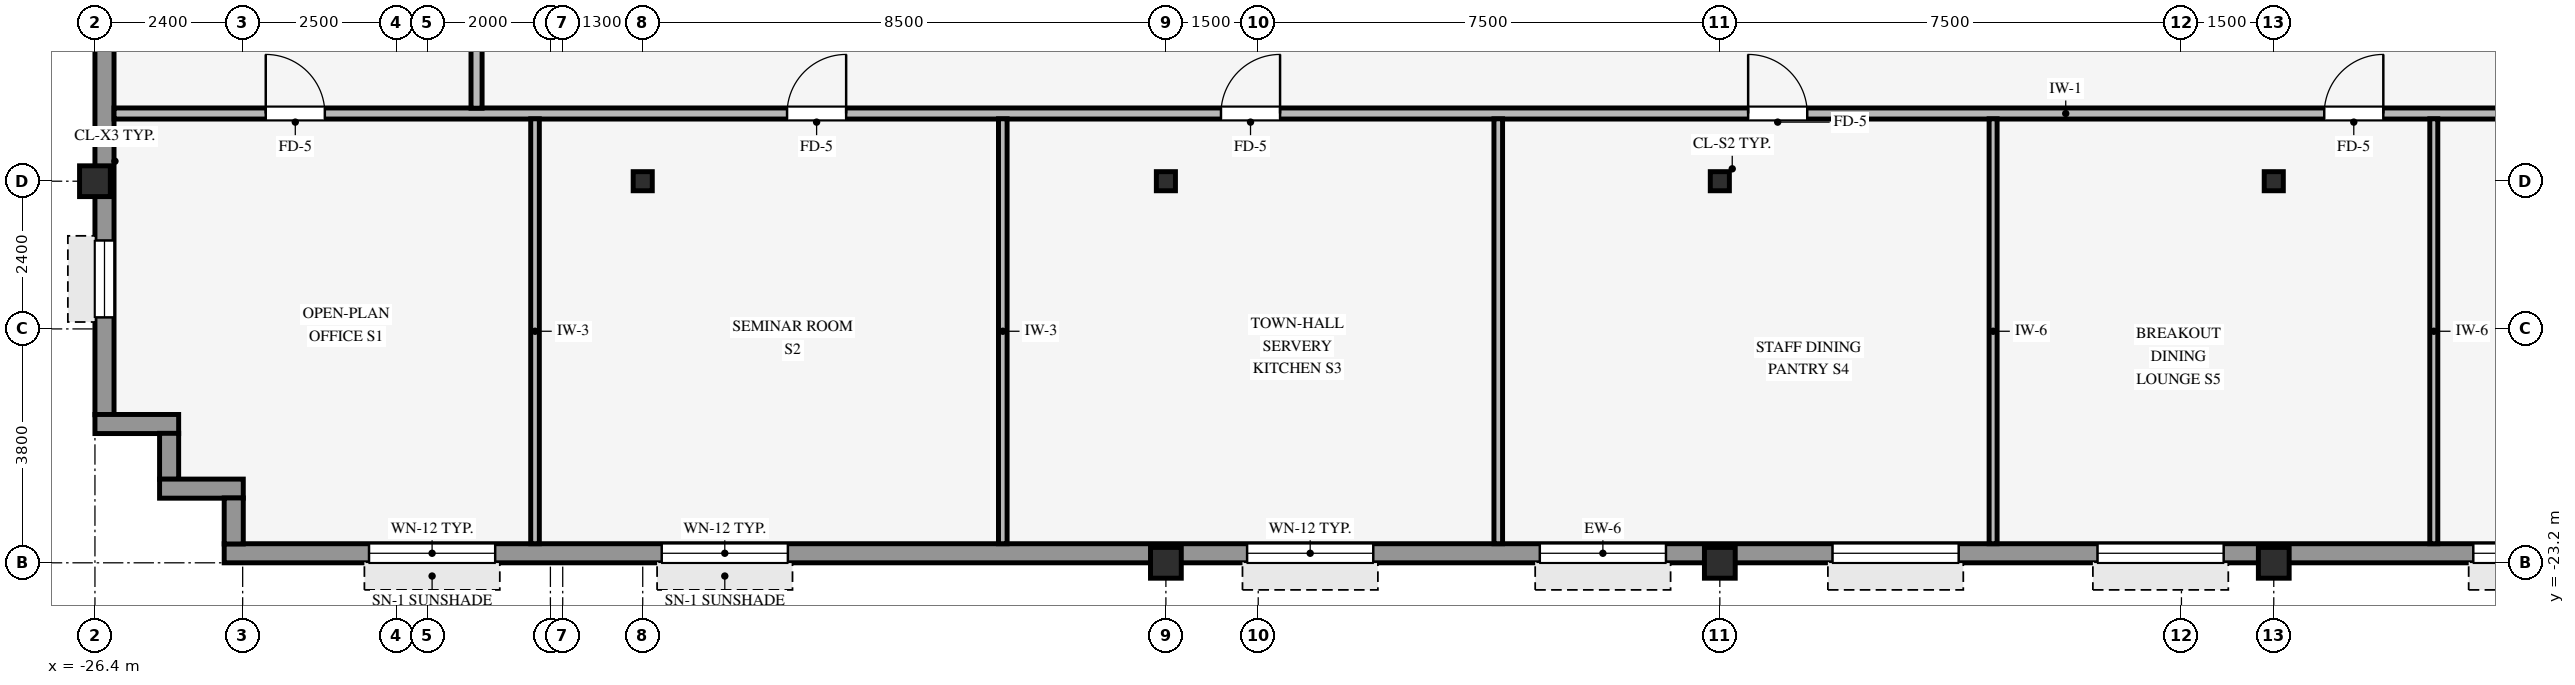
"""IFC4 building model, lengths in metres.
Left out: names, types, materials, properties, quantities, classifications, styles, units other than length and angle.
Written with IfcOpenShell. Run it as: python <this file> out.ifc"""

import sys

from ifc_helpers import new_model, si_unit, direction, frame, frame_2d, origin, origin_2d, place, context, subcontext, project, spatial, rectangle, hollow_rectangle, i_section, extrude, source, transform, mapped, element, fill, save


model = new_model("IFC4")
c1 = context("Model", 3, precision=1e-05, world=origin(), true_north=direction((0.0, 1.0)))
c2 = subcontext(c1, "Body", "Model", "MODEL_VIEW")
j1 = project(units=[si_unit("LENGTHUNIT", "METRE"), si_unit("PLANEANGLEUNIT", "RADIAN")], contexts=[c1])
p1 = place(None, origin())
s1 = spatial("IfcSite", under=j1, at=p1, CompositionType="ELEMENT")
p2 = place(p1, origin())
s2 = spatial("IfcBuilding", under=s1, at=p2, CompositionType="ELEMENT")
p3 = place(p2, frame((0.0, 0.0, 198.2)))
s3 = spatial("IfcBuildingStorey", under=s2, at=p3, CompositionType="ELEMENT", Elevation=198.2)
for number, where, z_axis, x_axis in (
    (1, (-26.4, -17.0, 0.0), (0.0, 0.0, 1.0), (1.0, 0.0, 0.0)),
    (2, (-9.0, -23.2, 0.0), (0.0, 0.0, 1.0), (1.0, 0.0, 0.0)),
    (3, (0.0, -23.2, 0.0), (0.0, 0.0, 1.0), (1.0, 0.0, 0.0)),
    (4, (9.0, -23.2, 0.0), (0.0, 0.0, 1.0), (1.0, 0.0, 0.0)),
):
    element("IfcColumn", number, at=place(p3, frame(where, z_axis=z_axis, x_axis=x_axis)), inside=s3, PredefinedType="COLUMN", context=c2, shape_type="SweptSolid", body=[
        extrude(hollow_rectangle(XDim=0.5, YDim=0.5, WallThickness=0.032, InnerFilletRadius=0.032, OuterFilletRadius=0.064, at=origin_2d()), origin(), (0.0, 0.0, 1.0), 3.37),
    ])
for number, where, z_axis, x_axis in (
    (5, (0.0, -17.0, 0.0), (0.0, 0.0, 1.0), (1.0, 0.0, 0.0)),
    (6, (-17.5, -17.0, 0.0), (0.0, 0.0, 1.0), (1.0, 0.0, 0.0)),
    (7, (-9.0, -17.0, 0.0), (0.0, 0.0, 1.0), (1.0, 0.0, 0.0)),
    (8, (9.0, -17.0, 0.0), (0.0, 0.0, 1.0), (1.0, 0.0, 0.0)),
):
    element("IfcColumn", number, at=place(p3, frame(where, z_axis=z_axis, x_axis=x_axis)), inside=s3, PredefinedType="COLUMN", context=c2, shape_type="SweptSolid", body=[
        extrude(i_section(OverallWidth=0.31, OverallDepth=0.31, WebThickness=0.015, FlangeThickness=0.015, FilletRadius=0.015, at=origin_2d()), origin(), (0.0, 0.0, 1.0), 3.37),
    ])
p4 = place(p3, frame((-24.3, -23.045, 0.0), z_axis=(0.0, 0.0, 1.0), x_axis=(1.0, 0.0, 0.0)))
e9 = element("IfcWall", 9, at=p4, inside=s3, PredefinedType="STANDARD", context=c2, shape_type="SweptSolid", body=[
    extrude(rectangle(XDim=44.8, YDim=0.31, at=frame_2d((22.4, 0.0))), origin(), (0.0, 0.0, 1.0), 2.705),
])
p5 = place(p4, frame((2.353, 0.0, 0.8)))
e10 = element("IfcOpeningElement", 10, at=p5, cuts=e9, PredefinedType="OPENING", context=c2, shape_type="SweptSolid", body=[
    extrude(rectangle(XDim=2.05, YDim=1.52, at=frame_2d((1.025, 0.76))), frame((0.0, 0.165, 0.0), z_axis=(0.0, -1.0, 0.0), x_axis=(1.0, 0.0, 0.0)), (0.0, 0.0, 1.0), 0.33),
])
p6 = place(p4, frame((7.108, 0.0, 0.8)))
e11 = element("IfcOpeningElement", 11, at=p6, cuts=e9, PredefinedType="OPENING", context=c2, shape_type="SweptSolid", body=[
    extrude(rectangle(XDim=2.05, YDim=1.52, at=frame_2d((1.025, 0.76))), frame((0.0, 0.165, 0.0), z_axis=(0.0, -1.0, 0.0), x_axis=(1.0, 0.0, 0.0)), (0.0, 0.0, 1.0), 0.33),
])
p7 = place(p4, frame((16.619, 0.0, 0.8)))
e12 = element("IfcOpeningElement", 12, at=p7, cuts=e9, PredefinedType="OPENING", context=c2, shape_type="SweptSolid", body=[
    extrude(rectangle(XDim=2.05, YDim=1.52, at=frame_2d((1.025, 0.76))), frame((0.0, 0.165, 0.0), z_axis=(0.0, -1.0, 0.0), x_axis=(1.0, 0.0, 0.0)), (0.0, 0.0, 1.0), 0.33),
])
p8 = place(p4, frame((21.375, 0.0, 0.8)))
e13 = element("IfcOpeningElement", 13, at=p8, cuts=e9, PredefinedType="OPENING", context=c2, shape_type="SweptSolid", body=[
    extrude(rectangle(XDim=2.05, YDim=1.52, at=frame_2d((1.025, 0.76))), frame((0.0, 0.165, 0.0), z_axis=(0.0, -1.0, 0.0), x_axis=(1.0, 0.0, 0.0)), (0.0, 0.0, 1.0), 0.33),
])
p9 = place(p4, frame((26.131, 0.0, 0.8)))
e14 = element("IfcOpeningElement", 14, at=p9, cuts=e9, PredefinedType="OPENING", context=c2, shape_type="SweptSolid", body=[
    extrude(rectangle(XDim=2.05, YDim=1.52, at=frame_2d((1.025, 0.76))), frame((0.0, 0.165, 0.0), z_axis=(0.0, -1.0, 0.0), x_axis=(1.0, 0.0, 0.0)), (0.0, 0.0, 1.0), 0.33),
])
p10 = place(p4, frame((30.436, 0.0, 0.8)))
e15 = element("IfcOpeningElement", 15, at=p10, cuts=e9, PredefinedType="OPENING", context=c2, shape_type="SweptSolid", body=[
    extrude(rectangle(XDim=2.05, YDim=1.52, at=frame_2d((1.025, 0.76))), frame((0.0, 0.165, 0.0), z_axis=(0.0, -1.0, 0.0), x_axis=(1.0, 0.0, 0.0)), (0.0, 0.0, 1.0), 0.33),
])
p11 = place(p4, frame((36.542, 0.0, 0.8)))
e16 = element("IfcOpeningElement", 16, at=p11, cuts=e9, PredefinedType="OPENING", context=c2, shape_type="SweptSolid", body=[
    extrude(rectangle(XDim=2.05, YDim=1.52, at=frame_2d((1.025, 0.76))), frame((0.0, 0.165, 0.0), z_axis=(0.0, -1.0, 0.0), x_axis=(1.0, 0.0, 0.0)), (0.0, 0.0, 1.0), 0.33),
])
p12 = place(p4, frame((40.397, 0.0, 0.8)))
e17 = element("IfcOpeningElement", 17, at=p12, cuts=e9, PredefinedType="OPENING", context=c2, shape_type="SweptSolid", body=[
    extrude(rectangle(XDim=2.05, YDim=1.52, at=frame_2d((1.025, 0.76))), frame((0.0, 0.165, 0.0), z_axis=(0.0, -1.0, 0.0), x_axis=(1.0, 0.0, 0.0)), (0.0, 0.0, 1.0), 0.33),
])
p13 = place(p3, frame((-26.245, -20.794, 0.0), z_axis=(0.0, 0.0, 1.0), x_axis=(0.0, 1.0, 0.0)))
e18 = element("IfcWall", 18, at=p13, inside=s3, PredefinedType="STANDARD", context=c2, shape_type="SweptSolid", body=[
    extrude(rectangle(XDim=37.788, YDim=0.31, at=frame_2d((18.894, 0.0))), origin(), (0.0, 0.0, 1.0), 2.705),
])
p14 = place(p13, frame((24.744, 0.0, 0.0)))
e19 = element("IfcOpeningElement", 19, at=p14, cuts=e18, PredefinedType="OPENING", context=c2, shape_type="SweptSolid", body=[
    extrude(rectangle(XDim=1.05, YDim=2.1, at=frame_2d((0.525, 1.05))), frame((0.0, 0.165, 0.0), z_axis=(0.0, -1.0, 0.0), x_axis=(1.0, 0.0, 0.0)), (0.0, 0.0, 1.0), 0.33),
])
p15 = place(p13, frame((1.581, 0.0, 0.8)))
e20 = element("IfcOpeningElement", 20, at=p15, cuts=e18, PredefinedType="OPENING", context=c2, shape_type="SweptSolid", body=[
    extrude(rectangle(XDim=1.25, YDim=1.52, at=frame_2d((0.625, 0.76))), frame((0.0, 0.165, 0.0), z_axis=(0.0, -1.0, 0.0), x_axis=(1.0, 0.0, 0.0)), (0.0, 0.0, 1.0), 0.33),
])
p16 = place(p13, frame((8.044, 0.0, 0.8)))
e21 = element("IfcOpeningElement", 21, at=p16, cuts=e18, PredefinedType="OPENING", context=c2, shape_type="SweptSolid", body=[
    extrude(rectangle(XDim=1.25, YDim=1.52, at=frame_2d((0.625, 0.76))), frame((0.0, 0.165, 0.0), z_axis=(0.0, -1.0, 0.0), x_axis=(1.0, 0.0, 0.0)), (0.0, 0.0, 1.0), 0.33),
])
p17 = place(p13, frame((13.156, 0.0, 0.8)))
e22 = element("IfcOpeningElement", 22, at=p17, cuts=e18, PredefinedType="OPENING", context=c2, shape_type="SweptSolid", body=[
    extrude(rectangle(XDim=1.25, YDim=1.52, at=frame_2d((0.625, 0.76))), frame((0.0, 0.165, 0.0), z_axis=(0.0, -1.0, 0.0), x_axis=(1.0, 0.0, 0.0)), (0.0, 0.0, 1.0), 0.33),
])
p18 = place(p13, frame((18.269, 0.0, 0.8)))
e23 = element("IfcOpeningElement", 23, at=p18, cuts=e18, PredefinedType="OPENING", context=c2, shape_type="SweptSolid", body=[
    extrude(rectangle(XDim=1.25, YDim=1.52, at=frame_2d((0.625, 0.76))), frame((0.0, 0.165, 0.0), z_axis=(0.0, -1.0, 0.0), x_axis=(1.0, 0.0, 0.0)), (0.0, 0.0, 1.0), 0.33),
])
p19 = place(p13, frame((22.932, 0.0, 0.8)))
e24 = element("IfcOpeningElement", 24, at=p19, cuts=e18, PredefinedType="OPENING", context=c2, shape_type="SweptSolid", body=[
    extrude(rectangle(XDim=1.25, YDim=1.52, at=frame_2d((0.625, 0.76))), frame((0.0, 0.165, 0.0), z_axis=(0.0, -1.0, 0.0), x_axis=(1.0, 0.0, 0.0)), (0.0, 0.0, 1.0), 0.33),
])
p20 = place(p13, frame((28.044, 0.0, 0.8)))
e25 = element("IfcOpeningElement", 25, at=p20, cuts=e18, PredefinedType="OPENING", context=c2, shape_type="SweptSolid", body=[
    extrude(rectangle(XDim=1.25, YDim=1.52, at=frame_2d((0.625, 0.76))), frame((0.0, 0.165, 0.0), z_axis=(0.0, -1.0, 0.0), x_axis=(1.0, 0.0, 0.0)), (0.0, 0.0, 1.0), 0.33),
])
p21 = place(p13, frame((33.607, 0.0, 0.8)))
e26 = element("IfcOpeningElement", 26, at=p21, cuts=e18, PredefinedType="OPENING", context=c2, shape_type="SweptSolid", body=[
    extrude(rectangle(XDim=1.25, YDim=1.52, at=frame_2d((0.625, 0.76))), frame((0.0, 0.165, 0.0), z_axis=(0.0, -1.0, 0.0), x_axis=(1.0, 0.0, 0.0)), (0.0, 0.0, 1.0), 0.33),
])
p22 = place(p3, frame((-26.4, -20.945, 0.0), z_axis=(0.0, 0.0, 1.0), x_axis=(1.0, 0.0, 0.0)))
e27 = element("IfcWall", 27, at=p22, inside=s3, PredefinedType="STANDARD", context=c2, shape_type="SweptSolid", body=[
    extrude(rectangle(XDim=1.36, YDim=0.31, at=frame_2d((0.68, 0.0))), origin(), (0.0, 0.0, 1.0), 3.36),
])
p23 = place(p3, frame((-25.195, -21.844, 0.0), z_axis=(0.0, 0.0, 1.0), x_axis=(0.0, 1.0, 0.0)))
e28 = element("IfcWall", 28, at=p23, inside=s3, PredefinedType="STANDARD", context=c2, shape_type="SweptSolid", body=[
    extrude(rectangle(XDim=0.748, YDim=0.31, at=frame_2d((0.374, 0.0))), origin(), (0.0, 0.0, 1.0), 3.36),
])
p24 = place(p3, frame((-25.35, -21.995, 0.0), z_axis=(0.0, 0.0, 1.0), x_axis=(1.0, 0.0, 0.0)))
e29 = element("IfcWall", 29, at=p24, inside=s3, PredefinedType="STANDARD", context=c2, shape_type="SweptSolid", body=[
    extrude(rectangle(XDim=1.36, YDim=0.31, at=frame_2d((0.68, 0.0))), origin(), (0.0, 0.0, 1.0), 3.36),
])
p25 = place(p3, frame((-24.145, -22.894, 0.0), z_axis=(0.0, 0.0, 1.0), x_axis=(0.0, 1.0, 0.0)))
e30 = element("IfcWall", 30, at=p25, inside=s3, PredefinedType="STANDARD", context=c2, shape_type="SweptSolid", body=[
    extrude(rectangle(XDim=0.748, YDim=0.31, at=frame_2d((0.374, 0.0))), origin(), (0.0, 0.0, 1.0), 3.36),
])
p26 = place(p3, frame((-26.09, -15.9, 0.0), z_axis=(0.0, 0.0, 1.0), x_axis=(1.0, 0.0, 0.0)))
e31 = element("IfcWall", 31, at=p26, inside=s3, PredefinedType="PARTITIONING", context=c2, shape_type="SweptSolid", body=[
    extrude(rectangle(XDim=48.38, YDim=0.18, at=frame_2d((24.19, 0.0))), origin(), (0.0, 0.0, 1.0), 3.36),
])
p27 = place(p26, frame((41.81, 0.0, 0.0)))
e32 = element("IfcOpeningElement", 32, at=p27, cuts=e31, PredefinedType="OPENING", context=c2, shape_type="SweptSolid", body=[
    extrude(rectangle(XDim=0.96, YDim=2.1, at=frame_2d((0.48, 1.05))), frame((0.0, 0.1, 0.0), z_axis=(0.0, -1.0, 0.0), x_axis=(1.0, 0.0, 0.0)), (0.0, 0.0, 1.0), 0.2),
])
p28 = place(p26, frame((17.985, 0.0, 0.0)))
e33 = element("IfcOpeningElement", 33, at=p28, cuts=e31, PredefinedType="OPENING", context=c2, shape_type="SweptSolid", body=[
    extrude(rectangle(XDim=0.96, YDim=2.1, at=frame_2d((0.48, 1.05))), frame((0.0, 0.1, 0.0), z_axis=(0.0, -1.0, 0.0), x_axis=(1.0, 0.0, 0.0)), (0.0, 0.0, 1.0), 0.2),
])
p29 = place(p26, frame((26.55, 0.0, 0.0)))
e34 = element("IfcOpeningElement", 34, at=p29, cuts=e31, PredefinedType="OPENING", context=c2, shape_type="SweptSolid", body=[
    extrude(rectangle(XDim=0.96, YDim=2.1, at=frame_2d((0.48, 1.05))), frame((0.0, 0.1, 0.0), z_axis=(0.0, -1.0, 0.0), x_axis=(1.0, 0.0, 0.0)), (0.0, 0.0, 1.0), 0.2),
])
p30 = place(p26, frame((10.935, 0.0, 0.0)))
e35 = element("IfcOpeningElement", 35, at=p30, cuts=e31, PredefinedType="OPENING", context=c2, shape_type="SweptSolid", body=[
    extrude(rectangle(XDim=0.96, YDim=2.1, at=frame_2d((0.48, 1.05))), frame((0.0, 0.1, 0.0), z_axis=(0.0, -1.0, 0.0), x_axis=(1.0, 0.0, 0.0)), (0.0, 0.0, 1.0), 0.2),
])
p31 = place(p26, frame((35.91, 0.0, 0.0)))
e36 = element("IfcOpeningElement", 36, at=p31, cuts=e31, PredefinedType="OPENING", context=c2, shape_type="SweptSolid", body=[
    extrude(rectangle(XDim=0.96, YDim=2.1, at=frame_2d((0.48, 1.05))), frame((0.0, 0.1, 0.0), z_axis=(0.0, -1.0, 0.0), x_axis=(1.0, 0.0, 0.0)), (0.0, 0.0, 1.0), 0.2),
])
p32 = place(p26, frame((2.465, 0.0, 0.0)))
e37 = element("IfcOpeningElement", 37, at=p32, cuts=e31, PredefinedType="OPENING", context=c2, shape_type="SweptSolid", body=[
    extrude(rectangle(XDim=0.96, YDim=2.1, at=frame_2d((0.48, 1.05))), frame((0.0, 0.1, 0.0), z_axis=(0.0, -1.0, 0.0), x_axis=(1.0, 0.0, 0.0)), (0.0, 0.0, 1.0), 0.2),
])
p33 = place(p3, frame((-20.2, -15.814, 0.0), z_axis=(0.0, 0.0, 1.0), x_axis=(0.0, 1.0, 0.0)))
e38 = element("IfcWall", 38, at=p33, inside=s3, PredefinedType="PARTITIONING", context=c2, shape_type="SweptSolid", body=[
    extrude(rectangle(XDim=31.628, YDim=0.18, at=frame_2d((15.814, 0.0))), origin(), (0.0, 0.0, 1.0), 3.36),
])
p34 = place(p33, frame((15.334, 0.0, 0.0)))
e39 = element("IfcOpeningElement", 39, at=p34, cuts=e38, PredefinedType="OPENING", context=c2, shape_type="SweptSolid", body=[
    extrude(rectangle(XDim=0.96, YDim=2.1, at=frame_2d((0.48, 1.05))), frame((0.0, 0.1, 0.0), z_axis=(0.0, -1.0, 0.0), x_axis=(1.0, 0.0, 0.0)), (0.0, 0.0, 1.0), 0.2),
])
p35 = place(p33, frame((5.834, 0.0, 0.0)))
e40 = element("IfcOpeningElement", 40, at=p35, cuts=e38, PredefinedType="OPENING", context=c2, shape_type="SweptSolid", body=[
    extrude(rectangle(XDim=0.96, YDim=2.1, at=frame_2d((0.48, 1.05))), frame((0.0, 0.1, 0.0), z_axis=(0.0, -1.0, 0.0), x_axis=(1.0, 0.0, 0.0)), (0.0, 0.0, 1.0), 0.2),
])
p36 = place(p33, frame((24.834, 0.0, 0.0)))
e41 = element("IfcOpeningElement", 41, at=p36, cuts=e38, PredefinedType="OPENING", context=c2, shape_type="SweptSolid", body=[
    extrude(rectangle(XDim=0.96, YDim=2.1, at=frame_2d((0.48, 1.05))), frame((0.0, 0.1, 0.0), z_axis=(0.0, -1.0, 0.0), x_axis=(1.0, 0.0, 0.0)), (0.0, 0.0, 1.0), 0.2),
])
for number, where, z_axis, x_axis in (
    (42, (-19.25, -22.89, 0.0), (0.0, 0.0, 1.0), (0.0, 1.0, 0.0)),
    (43, (-11.65, -22.89, 0.0), (0.0, 0.0, 1.0), (0.0, 1.0, 0.0)),
    (44, (-3.6, -22.89, 0.0), (0.0, 0.0, 1.0), (0.0, 1.0, 0.0)),
):
    element("IfcWall", number, at=place(p3, frame(where, z_axis=z_axis, x_axis=x_axis)), inside=s3, PredefinedType="PARTITIONING", context=c2, shape_type="SweptSolid", body=[
        extrude(rectangle(XDim=6.904, YDim=0.14, at=frame_2d((3.452, 0.0))), origin(), (0.0, 0.0, 1.0), 3.36),
    ])
for number, where, z_axis, x_axis in (
    (45, (4.44, -22.89, 0.0), (0.0, 0.0, 1.0), (0.0, 1.0, 0.0)),
    (46, (11.6, -22.89, 0.0), (0.0, 0.0, 1.0), (0.0, 1.0, 0.0)),
):
    element("IfcWall", number, at=place(p3, frame(where, z_axis=z_axis, x_axis=x_axis)), inside=s3, PredefinedType="PARTITIONING", context=c2, shape_type="SweptSolid", body=[
        extrude(rectangle(XDim=6.904, YDim=0.13, at=frame_2d((3.452, 0.0))), origin(), (0.0, 0.0, 1.0), 3.36),
    ])
m1 = source(origin(), c2, "Body", "SweptSolid", [
    extrude(rectangle(XDim=2.05, YDim=1.52, at=frame_2d((1.025, 0.76))), frame((0.0, 0.03, 0.0), z_axis=(0.0, -1.0, 0.0), x_axis=(1.0, 0.0, 0.0)), (0.0, 0.0, 1.0), 0.06),
])
p37 = place(p5, origin())
e47 = element("IfcWindow", 47, at=p37, inside=s3, PartitioningType="SINGLE_PANEL", PredefinedType="WINDOW", context=c2, shape_type="MappedRepresentation", body=[
    mapped(m1, transform((0.0, 0.0, 0.0), scale=1.0)),
])
fill(e10, e47)
p38 = place(p6, origin())
e48 = element("IfcWindow", 48, at=p38, inside=s3, PartitioningType="SINGLE_PANEL", PredefinedType="WINDOW", context=c2, shape_type="MappedRepresentation", body=[
    mapped(m1, transform((0.0, 0.0, 0.0), scale=1.0)),
])
fill(e11, e48)
p39 = place(p7, origin())
e49 = element("IfcWindow", 49, at=p39, inside=s3, PartitioningType="SINGLE_PANEL", PredefinedType="WINDOW", context=c2, shape_type="MappedRepresentation", body=[
    mapped(m1, transform((0.0, 0.0, 0.0), scale=1.0)),
])
fill(e12, e49)
p40 = place(p8, origin())
e50 = element("IfcWindow", 50, at=p40, inside=s3, PartitioningType="SINGLE_PANEL", PredefinedType="WINDOW", context=c2, shape_type="MappedRepresentation", body=[
    mapped(m1, transform((0.0, 0.0, 0.0), scale=1.0)),
])
fill(e13, e50)
p41 = place(p9, origin())
e51 = element("IfcWindow", 51, at=p41, inside=s3, PartitioningType="SINGLE_PANEL", PredefinedType="WINDOW", context=c2, shape_type="MappedRepresentation", body=[
    mapped(m1, transform((0.0, 0.0, 0.0), scale=1.0)),
])
fill(e14, e51)
p42 = place(p10, origin())
e52 = element("IfcWindow", 52, at=p42, inside=s3, PartitioningType="SINGLE_PANEL", PredefinedType="WINDOW", context=c2, shape_type="MappedRepresentation", body=[
    mapped(m1, transform((0.0, 0.0, 0.0), scale=1.0)),
])
fill(e15, e52)
p43 = place(p11, origin())
e53 = element("IfcWindow", 53, at=p43, inside=s3, PartitioningType="SINGLE_PANEL", PredefinedType="WINDOW", context=c2, shape_type="MappedRepresentation", body=[
    mapped(m1, transform((0.0, 0.0, 0.0), scale=1.0)),
])
fill(e16, e53)
m2 = source(origin(), c2, "Body", "SweptSolid", [
    extrude(rectangle(XDim=1.25, YDim=1.52, at=frame_2d((0.625, 0.76))), frame((0.0, 0.03, 0.0), z_axis=(0.0, -1.0, 0.0), x_axis=(1.0, 0.0, 0.0)), (0.0, 0.0, 1.0), 0.06),
])
p44 = place(p15, origin())
e54 = element("IfcWindow", 54, at=p44, inside=s3, PartitioningType="SINGLE_PANEL", PredefinedType="WINDOW", context=c2, shape_type="MappedRepresentation", body=[
    mapped(m2, transform((0.0, 0.0, 0.0), scale=1.0)),
])
fill(e20, e54)
m3 = source(origin(), c2, "Body", "SweptSolid", [
    extrude(rectangle(XDim=0.96, YDim=2.1, at=frame_2d((0.48, 1.05))), frame((0.0, 0.025, 0.0), z_axis=(0.0, -1.0, 0.0), x_axis=(1.0, 0.0, 0.0)), (0.0, 0.0, 1.0), 0.05),
])
p45 = place(p28, origin())
e55 = element("IfcDoor", 55, at=p45, inside=s3, OperationType="SINGLE_SWING_RIGHT", PredefinedType="DOOR", context=c2, shape_type="MappedRepresentation", body=[
    mapped(m3, transform((0.0, 0.0, 0.0), scale=1.0)),
])
fill(e33, e55)
p46 = place(p29, origin())
e56 = element("IfcDoor", 56, at=p46, inside=s3, OperationType="SINGLE_SWING_LEFT", PredefinedType="DOOR", context=c2, shape_type="MappedRepresentation", body=[
    mapped(m3, transform((0.0, 0.0, 0.0), scale=1.0)),
])
fill(e34, e56)
p47 = place(p30, origin())
e57 = element("IfcDoor", 57, at=p47, inside=s3, OperationType="SINGLE_SWING_RIGHT", PredefinedType="DOOR", context=c2, shape_type="MappedRepresentation", body=[
    mapped(m3, transform((0.0, 0.0, 0.0), scale=1.0)),
])
fill(e35, e57)
p48 = place(p31, origin())
e58 = element("IfcDoor", 58, at=p48, inside=s3, OperationType="SINGLE_SWING_RIGHT", PredefinedType="DOOR", context=c2, shape_type="MappedRepresentation", body=[
    mapped(m3, transform((0.0, 0.0, 0.0), scale=1.0)),
])
fill(e36, e58)
p49 = place(p32, origin())
e59 = element("IfcDoor", 59, at=p49, inside=s3, OperationType="SINGLE_SWING_LEFT", PredefinedType="DOOR", context=c2, shape_type="MappedRepresentation", body=[
    mapped(m3, transform((0.0, 0.0, 0.0), scale=1.0)),
])
fill(e37, e59)
save(model, sys.argv[1])
